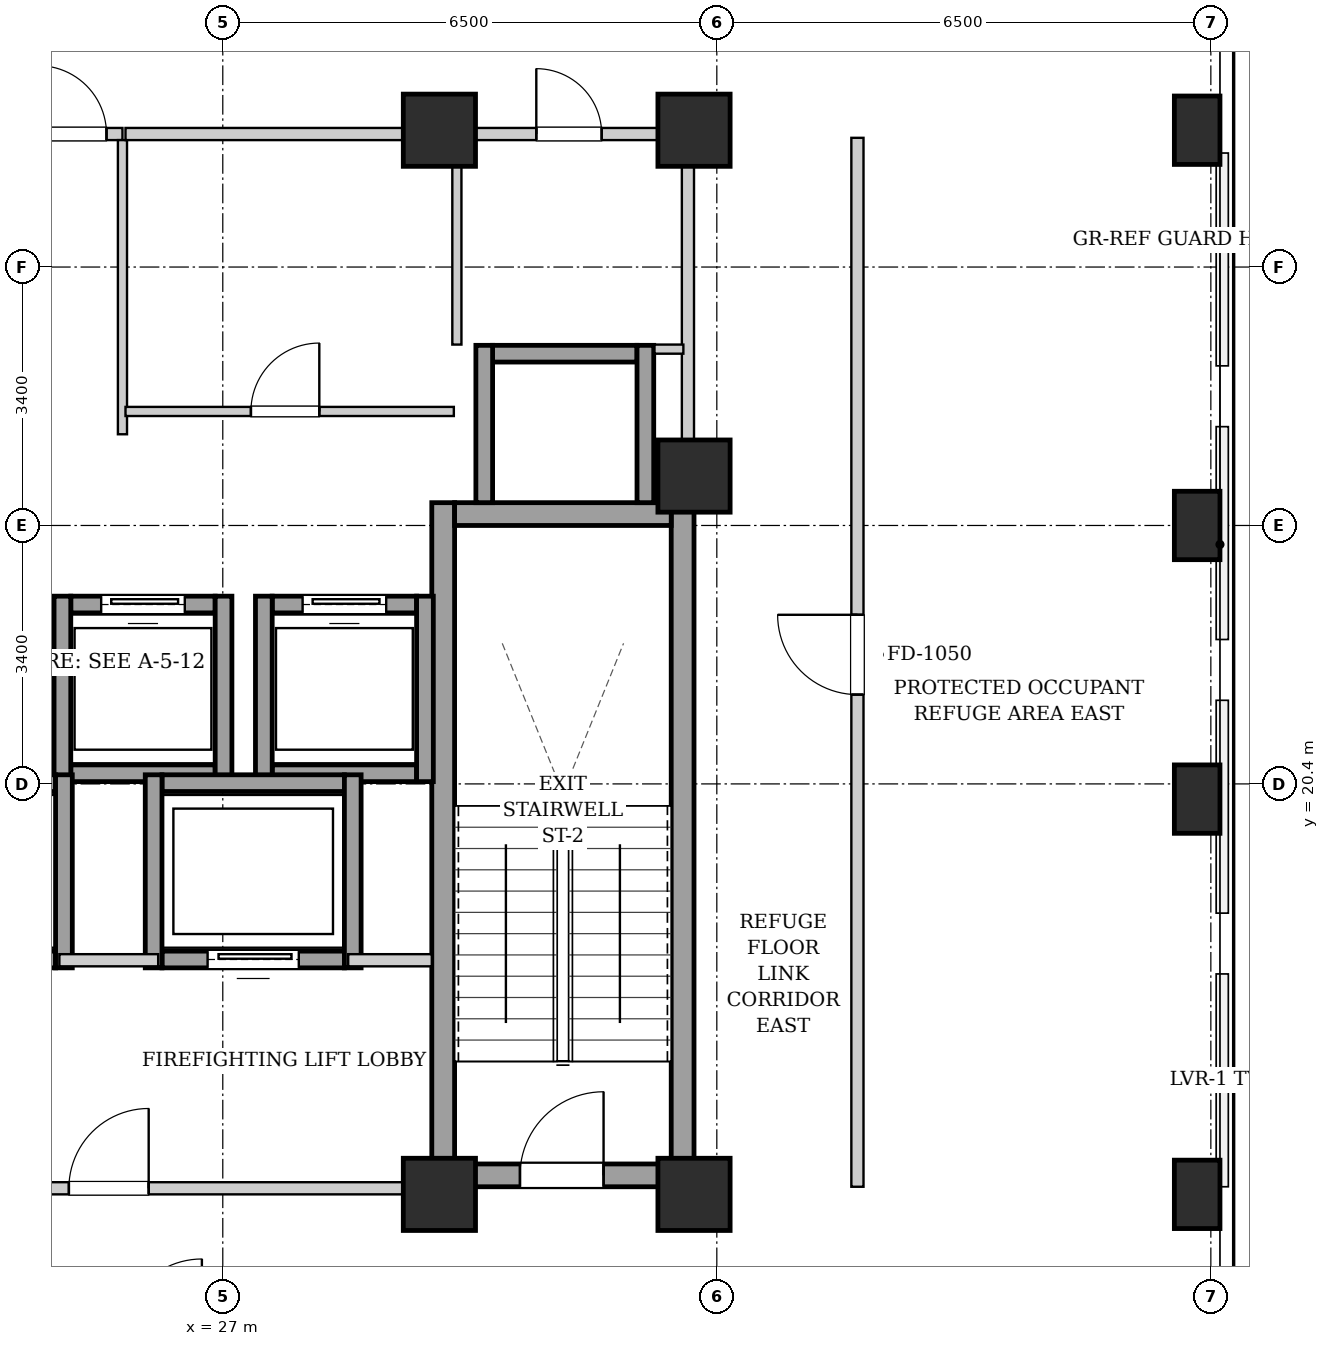
"""IFC4 building model, lengths in metres.
Left out: names, types, materials, properties, quantities, classifications, styles, units other than length and angle.
Written with IfcOpenShell. Run it as: python <this file> out.ifc"""

import sys

from ifc_helpers import new_model, si_unit, direction, frame, frame_2d, origin, origin_2d, place, context, subcontext, project, spatial, rectangle, extrude, element, fill, save


model = new_model("IFC4")
c1 = context("Model", 3, precision=1e-05, world=origin(), true_north=direction((0.0, 1.0)))
c2 = subcontext(c1, "Body", "Model", "MODEL_VIEW")
j1 = project(units=[si_unit("LENGTHUNIT", "METRE"), si_unit("PLANEANGLEUNIT", "RADIAN")], contexts=[c1])
p1 = place(None, origin())
s1 = spatial("IfcSite", under=j1, at=p1, CompositionType="ELEMENT")
p2 = place(p1, origin())
s2 = spatial("IfcBuilding", under=s1, at=p2, CompositionType="ELEMENT")
p3 = place(p2, frame((0.0, 0.0, 169.9)))
s3 = spatial("IfcBuildingStorey", under=s2, at=p3, CompositionType="ELEMENT", Elevation=169.9)
for number, where, z_axis, x_axis in (
    (1, (39.82, 15.0, 0.0), (0.0, 0.0, 1.0), (1.0, 0.0, 0.0)),
    (2, (39.82, 20.2, 0.0), (0.0, 0.0, 1.0), (1.0, 0.0, 0.0)),
    (3, (39.82, 23.8, 0.0), (0.0, 0.0, 1.0), (1.0, 0.0, 0.0)),
    (4, (39.82, 29.0, 0.0), (0.0, 0.0, 1.0), (1.0, 0.0, 0.0)),
):
    element("IfcColumn", number, at=place(p3, frame(where, z_axis=z_axis, x_axis=x_axis)), inside=s3, PredefinedType="COLUMN", context=c2, shape_type="SweptSolid", body=[
        extrude(rectangle(XDim=0.6, YDim=0.9, at=origin_2d()), origin(), (0.0, 0.0, 1.0), 4.5),
    ])
for number, where, z_axis, x_axis in (
    (5, (29.85, 15.0, 0.0), (0.0, 0.0, 1.0), (1.0, 0.0, 0.0)),
    (6, (33.2, 15.0, 0.0), (0.0, 0.0, 1.0), (1.0, 0.0, 0.0)),
    (7, (29.85, 29.0, 0.0), (0.0, 0.0, 1.0), (1.0, 0.0, 0.0)),
    (8, (33.2, 29.0, 0.0), (0.0, 0.0, 1.0), (1.0, 0.0, 0.0)),
    (9, (33.2, 24.45, 0.0), (0.0, 0.0, 1.0), (1.0, 0.0, 0.0)),
):
    element("IfcColumn", number, at=place(p3, frame(where, z_axis=z_axis, x_axis=x_axis)), inside=s3, PredefinedType="COLUMN", context=c2, shape_type="SweptSolid", body=[
        extrude(rectangle(XDim=0.95, YDim=0.95, at=origin_2d()), origin(), (0.0, 0.0, 1.0), 4.5),
    ])
for number, where, z_axis, x_axis in (
    (10, (29.9, 15.1, 0.0), (0.0, 0.0, 1.0), (0.0, 1.0, 0.0)),
    (11, (33.05, 15.1, 0.0), (0.0, 0.0, 1.0), (0.0, 1.0, 0.0)),
):
    element("IfcWall", number, at=place(p3, frame(where, z_axis=z_axis, x_axis=x_axis)), inside=s3, PredefinedType="SHEAR", context=c2, shape_type="SweptSolid", body=[
        extrude(rectangle(XDim=9.0, YDim=0.3, at=frame_2d((4.5, 0.0))), origin(), (0.0, 0.0, 1.0), 4.18),
    ])
p4 = place(p3, frame((30.05, 23.95, 0.0), z_axis=(0.0, 0.0, 1.0), x_axis=(1.0, 0.0, 0.0)))
e12 = element("IfcWall", 12, at=p4, inside=s3, PredefinedType="SHEAR", context=c2, shape_type="SweptSolid", body=[
    extrude(rectangle(XDim=2.85, YDim=0.3, at=frame_2d((1.425, 0.0))), origin(), (0.0, 0.0, 1.0), 4.18),
])
p5 = place(p3, frame((30.05, 15.25, 0.0), z_axis=(0.0, 0.0, 1.0), x_axis=(1.0, 0.0, 0.0)))
e13 = element("IfcWall", 13, at=p5, inside=s3, PredefinedType="SHEAR", context=c2, shape_type="SweptSolid", body=[
    extrude(rectangle(XDim=2.85, YDim=0.3, at=frame_2d((1.425, 0.0))), origin(), (0.0, 0.0, 1.0), 4.18),
])
p6 = place(p5, frame((0.86, 0.0, 0.0)))
e14 = element("IfcOpeningElement", 14, at=p6, cuts=e13, PredefinedType="OPENING", context=c2, shape_type="SweptSolid", body=[
    extrude(rectangle(XDim=1.1, YDim=2.05, at=frame_2d((0.55, 1.025))), frame((0.0, 0.16, 0.0), z_axis=(0.0, -1.0, 0.0), x_axis=(1.0, 0.0, 0.0)), (0.0, 0.0, 1.0), 0.32),
])
p7 = place(p3, frame((25.0, 20.54, 0.0), z_axis=(0.0, 0.0, 1.0), x_axis=(1.0, 0.0, 0.0)))
e15 = element("IfcWall", 15, at=p7, inside=s3, PredefinedType="SHEAR", context=c2, shape_type="SweptSolid", body=[
    extrude(rectangle(XDim=1.9, YDim=0.22, at=frame_2d((0.95, 0.0))), origin(), (0.0, 0.0, 1.0), 4.18),
])
p8 = place(p3, frame((25.0, 22.76, 0.0), z_axis=(0.0, 0.0, 1.0), x_axis=(1.0, 0.0, 0.0)))
e16 = element("IfcWall", 16, at=p8, inside=s3, PredefinedType="SHEAR", context=c2, shape_type="SweptSolid", body=[
    extrude(rectangle(XDim=1.9, YDim=0.22, at=frame_2d((0.95, 0.0))), origin(), (0.0, 0.0, 1.0), 4.18),
])
p9 = place(p8, frame((0.4, 0.0, 0.0)))
e17 = element("IfcOpeningElement", 17, at=p9, cuts=e16, PredefinedType="OPENING", context=c2, shape_type="SweptSolid", body=[
    extrude(rectangle(XDim=1.1, YDim=2.15, at=frame_2d((0.55, 1.075))), frame((0.0, 0.12, 0.0), z_axis=(0.0, -1.0, 0.0), x_axis=(1.0, 0.0, 0.0)), (0.0, 0.0, 1.0), 0.24),
])
for number, where, z_axis, x_axis in (
    (18, (24.89, 20.43, 0.0), (0.0, 0.0, 1.0), (0.0, 1.0, 0.0)),
    (19, (27.01, 20.43, 0.0), (0.0, 0.0, 1.0), (0.0, 1.0, 0.0)),
):
    element("IfcWall", number, at=place(p3, frame(where, z_axis=z_axis, x_axis=x_axis)), inside=s3, PredefinedType="SHEAR", context=c2, shape_type="SweptSolid", body=[
        extrude(rectangle(XDim=2.44, YDim=0.22, at=frame_2d((1.22, 0.0))), origin(), (0.0, 0.0, 1.0), 4.18),
    ])
p10 = place(p3, frame((27.65, 20.54, 0.0), z_axis=(0.0, 0.0, 1.0), x_axis=(1.0, 0.0, 0.0)))
e20 = element("IfcWall", 20, at=p10, inside=s3, PredefinedType="SHEAR", context=c2, shape_type="SweptSolid", body=[
    extrude(rectangle(XDim=1.9, YDim=0.22, at=frame_2d((0.95, 0.0))), origin(), (0.0, 0.0, 1.0), 4.18),
])
p11 = place(p3, frame((27.65, 22.76, 0.0), z_axis=(0.0, 0.0, 1.0), x_axis=(1.0, 0.0, 0.0)))
e21 = element("IfcWall", 21, at=p11, inside=s3, PredefinedType="SHEAR", context=c2, shape_type="SweptSolid", body=[
    extrude(rectangle(XDim=1.9, YDim=0.22, at=frame_2d((0.95, 0.0))), origin(), (0.0, 0.0, 1.0), 4.18),
])
p12 = place(p11, frame((0.4, 0.0, 0.0)))
e22 = element("IfcOpeningElement", 22, at=p12, cuts=e21, PredefinedType="OPENING", context=c2, shape_type="SweptSolid", body=[
    extrude(rectangle(XDim=1.1, YDim=2.15, at=frame_2d((0.55, 1.075))), frame((0.0, 0.12, 0.0), z_axis=(0.0, -1.0, 0.0), x_axis=(1.0, 0.0, 0.0)), (0.0, 0.0, 1.0), 0.24),
])
for number, where, z_axis, x_axis in (
    (23, (27.54, 20.43, 0.0), (0.0, 0.0, 1.0), (0.0, 1.0, 0.0)),
    (24, (29.66, 20.43, 0.0), (0.0, 0.0, 1.0), (0.0, 1.0, 0.0)),
):
    element("IfcWall", number, at=place(p3, frame(where, z_axis=z_axis, x_axis=x_axis)), inside=s3, PredefinedType="SHEAR", context=c2, shape_type="SweptSolid", body=[
        extrude(rectangle(XDim=2.44, YDim=0.22, at=frame_2d((1.22, 0.0))), origin(), (0.0, 0.0, 1.0), 4.18),
    ])
p13 = place(p3, frame((30.55, 26.06, 0.0), z_axis=(0.0, 0.0, 1.0), x_axis=(1.0, 0.0, 0.0)))
e25 = element("IfcWall", 25, at=p13, inside=s3, PredefinedType="SHEAR", context=c2, shape_type="SweptSolid", body=[
    extrude(rectangle(XDim=1.9, YDim=0.22, at=frame_2d((0.95, 0.0))), origin(), (0.0, 0.0, 1.0), 4.18),
])
for number, where, z_axis, x_axis in (
    (26, (30.44, 24.1, 0.0), (0.0, 0.0, 1.0), (0.0, 1.0, 0.0)),
    (27, (32.56, 24.1, 0.0), (0.0, 0.0, 1.0), (0.0, 1.0, 0.0)),
):
    element("IfcWall", number, at=place(p3, frame(where, z_axis=z_axis, x_axis=x_axis)), inside=s3, PredefinedType="SHEAR", context=c2, shape_type="SweptSolid", body=[
        extrude(rectangle(XDim=2.07, YDim=0.22, at=frame_2d((1.035, 0.0))), origin(), (0.0, 0.0, 1.0), 4.18),
    ])
p14 = place(p3, frame((22.4, 18.09, 0.0), z_axis=(0.0, 0.0, 1.0), x_axis=(1.0, 0.0, 0.0)))
e28 = element("IfcWall", 28, at=p14, inside=s3, PredefinedType="SHEAR", context=c2, shape_type="SweptSolid", body=[
    extrude(rectangle(XDim=2.4, YDim=0.22, at=frame_2d((1.2, 0.0))), origin(), (0.0, 0.0, 1.0), 4.18),
])
p15 = place(p14, frame((0.6, 0.0, 0.0)))
e29 = element("IfcOpeningElement", 29, at=p15, cuts=e28, PredefinedType="OPENING", context=c2, shape_type="SweptSolid", body=[
    extrude(rectangle(XDim=1.2, YDim=2.15, at=frame_2d((0.6, 1.075))), frame((0.0, 0.12, 0.0), z_axis=(0.0, -1.0, 0.0), x_axis=(1.0, 0.0, 0.0)), (0.0, 0.0, 1.0), 0.24),
])
p16 = place(p3, frame((22.4, 20.41, 0.0), z_axis=(0.0, 0.0, 1.0), x_axis=(1.0, 0.0, 0.0)))
e30 = element("IfcWall", 30, at=p16, inside=s3, PredefinedType="SHEAR", context=c2, shape_type="SweptSolid", body=[
    extrude(rectangle(XDim=2.4, YDim=0.22, at=frame_2d((1.2, 0.0))), origin(), (0.0, 0.0, 1.0), 4.18),
])
p17 = place(p3, frame((24.91, 17.98, 0.0), z_axis=(0.0, 0.0, 1.0), x_axis=(0.0, 1.0, 0.0)))
e31 = element("IfcWall", 31, at=p17, inside=s3, PredefinedType="SHEAR", context=c2, shape_type="SweptSolid", body=[
    extrude(rectangle(XDim=2.54, YDim=0.22, at=frame_2d((1.27, 0.0))), origin(), (0.0, 0.0, 1.0), 4.18),
])
p18 = place(p3, frame((26.2, 18.09, 0.0), z_axis=(0.0, 0.0, 1.0), x_axis=(1.0, 0.0, 0.0)))
e32 = element("IfcWall", 32, at=p18, inside=s3, PredefinedType="SHEAR", context=c2, shape_type="SweptSolid", body=[
    extrude(rectangle(XDim=2.4, YDim=0.22, at=frame_2d((1.2, 0.0))), origin(), (0.0, 0.0, 1.0), 4.18),
])
p19 = place(p18, frame((0.6, 0.0, 0.0)))
e33 = element("IfcOpeningElement", 33, at=p19, cuts=e32, PredefinedType="OPENING", context=c2, shape_type="SweptSolid", body=[
    extrude(rectangle(XDim=1.2, YDim=2.15, at=frame_2d((0.6, 1.075))), frame((0.0, 0.12, 0.0), z_axis=(0.0, -1.0, 0.0), x_axis=(1.0, 0.0, 0.0)), (0.0, 0.0, 1.0), 0.24),
])
p20 = place(p3, frame((26.2, 20.41, 0.0), z_axis=(0.0, 0.0, 1.0), x_axis=(1.0, 0.0, 0.0)))
e34 = element("IfcWall", 34, at=p20, inside=s3, PredefinedType="SHEAR", context=c2, shape_type="SweptSolid", body=[
    extrude(rectangle(XDim=2.4, YDim=0.22, at=frame_2d((1.2, 0.0))), origin(), (0.0, 0.0, 1.0), 4.18),
])
for number, where, z_axis, x_axis in (
    (35, (26.09, 17.98, 0.0), (0.0, 0.0, 1.0), (0.0, 1.0, 0.0)),
    (36, (28.71, 17.98, 0.0), (0.0, 0.0, 1.0), (0.0, 1.0, 0.0)),
):
    element("IfcWall", number, at=place(p3, frame(where, z_axis=z_axis, x_axis=x_axis)), inside=s3, PredefinedType="SHEAR", context=c2, shape_type="SweptSolid", body=[
        extrude(rectangle(XDim=2.54, YDim=0.22, at=frame_2d((1.27, 0.0))), origin(), (0.0, 0.0, 1.0), 4.18),
    ])
p21 = place(p3, frame((21.25, 15.08, 0.0), z_axis=(0.0, 0.0, 1.0), x_axis=(1.0, 0.0, 0.0)))
e37 = element("IfcWall", 37, at=p21, inside=s3, PredefinedType="PARTITIONING", context=c2, shape_type="SweptSolid", body=[
    extrude(rectangle(XDim=8.5, YDim=0.16, at=frame_2d((4.25, 0.0))), origin(), (0.0, 0.0, 1.0), 4.18),
])
p22 = place(p21, frame((3.725, 0.0, 0.0)))
e38 = element("IfcOpeningElement", 38, at=p22, cuts=e37, PredefinedType="OPENING", context=c2, shape_type="SweptSolid", body=[
    extrude(rectangle(XDim=1.05, YDim=2.05, at=frame_2d((0.525, 1.025))), frame((0.0, 0.09, 0.0), z_axis=(0.0, -1.0, 0.0), x_axis=(1.0, 0.0, 0.0)), (0.0, 0.0, 1.0), 0.18),
])
p23 = place(p3, frame((24.85, 18.08, 0.0), z_axis=(0.0, 0.0, 1.0), x_axis=(1.0, 0.0, 0.0)))
e39 = element("IfcWall", 39, at=p23, inside=s3, PredefinedType="PARTITIONING", context=c2, shape_type="SweptSolid", body=[
    extrude(rectangle(XDim=1.3, YDim=0.16, at=frame_2d((0.65, 0.0))), origin(), (0.0, 0.0, 1.0), 4.18),
])
p24 = place(p3, frame((28.65, 18.08, 0.0), z_axis=(0.0, 0.0, 1.0), x_axis=(1.0, 0.0, 0.0)))
e40 = element("IfcWall", 40, at=p24, inside=s3, PredefinedType="PARTITIONING", context=c2, shape_type="SweptSolid", body=[
    extrude(rectangle(XDim=1.1, YDim=0.16, at=frame_2d((0.55, 0.0))), origin(), (0.0, 0.0, 1.0), 4.18),
])
p25 = place(p3, frame((33.12, 24.12, 0.0), z_axis=(0.0, 0.0, 1.0), x_axis=(0.0, 1.0, 0.0)))
e41 = element("IfcWall", 41, at=p25, inside=s3, PredefinedType="PARTITIONING", context=c2, shape_type="SweptSolid", body=[
    extrude(rectangle(XDim=4.76, YDim=0.16, at=frame_2d((2.38, 0.0))), origin(), (0.0, 0.0, 1.0), 4.18),
])
p26 = place(p3, frame((24.36, 28.95, 0.0), z_axis=(0.0, 0.0, 1.0), x_axis=(1.0, 0.0, 0.0)))
e42 = element("IfcWall", 42, at=p26, inside=s3, PredefinedType="PARTITIONING", context=c2, shape_type="SweptSolid", body=[
    extrude(rectangle(XDim=1.32, YDim=0.16, at=frame_2d((0.66, 0.0))), origin(), (0.0, 0.0, 1.0), 4.18),
])
p27 = place(p26, frame((0.21, 0.0, 0.0)))
e43 = element("IfcOpeningElement", 43, at=p27, cuts=e42, PredefinedType="OPENING", context=c2, shape_type="SweptSolid", body=[
    extrude(rectangle(XDim=0.9, YDim=2.05, at=frame_2d((0.45, 1.025))), frame((0.0, 0.09, 0.0), z_axis=(0.0, -1.0, 0.0), x_axis=(1.0, 0.0, 0.0)), (0.0, 0.0, 1.0), 0.18),
])
p28 = place(p3, frame((25.68, 25.0, 0.0), z_axis=(0.0, 0.0, 1.0), x_axis=(0.0, 1.0, 0.0)))
e44 = element("IfcWall", 44, at=p28, inside=s3, PredefinedType="PARTITIONING", context=c2, shape_type="SweptSolid", body=[
    extrude(rectangle(XDim=3.87, YDim=0.12, at=frame_2d((1.935, 0.0))), origin(), (0.0, 0.0, 1.0), 4.18),
])
p29 = place(p3, frame((30.08, 26.18, 0.0), z_axis=(0.0, 0.0, 1.0), x_axis=(0.0, 1.0, 0.0)))
e45 = element("IfcWall", 45, at=p29, inside=s3, PredefinedType="PARTITIONING", context=c2, shape_type="SweptSolid", body=[
    extrude(rectangle(XDim=2.68, YDim=0.12, at=frame_2d((1.34, 0.0))), origin(), (0.0, 0.0, 1.0), 4.18),
])
p30 = place(p3, frame((32.68, 26.12, 0.0), z_axis=(0.0, 0.0, 1.0), x_axis=(1.0, 0.0, 0.0)))
e46 = element("IfcWall", 46, at=p30, inside=s3, PredefinedType="PARTITIONING", context=c2, shape_type="SweptSolid", body=[
    extrude(rectangle(XDim=0.38, YDim=0.12, at=frame_2d((0.19, 0.0))), origin(), (0.0, 0.0, 1.0), 4.18),
])
p31 = place(p3, frame((25.72, 28.95, 0.0), z_axis=(0.0, 0.0, 1.0), x_axis=(1.0, 0.0, 0.0)))
e47 = element("IfcWall", 47, at=p31, inside=s3, PredefinedType="PARTITIONING", context=c2, shape_type="SweptSolid", body=[
    extrude(rectangle(XDim=4.32, YDim=0.16, at=frame_2d((2.16, 0.0))), origin(), (0.0, 0.0, 1.0), 4.18),
])
p32 = place(p3, frame((25.72, 25.3, 0.0), z_axis=(0.0, 0.0, 1.0), x_axis=(1.0, 0.0, 0.0)))
e48 = element("IfcWall", 48, at=p32, inside=s3, PredefinedType="PARTITIONING", context=c2, shape_type="SweptSolid", body=[
    extrude(rectangle(XDim=4.32, YDim=0.12, at=frame_2d((2.16, 0.0))), origin(), (0.0, 0.0, 1.0), 4.18),
])
p33 = place(p32, frame((1.65, 0.0, 0.0)))
e49 = element("IfcOpeningElement", 49, at=p33, cuts=e48, PredefinedType="OPENING", context=c2, shape_type="SweptSolid", body=[
    extrude(rectangle(XDim=0.9, YDim=2.05, at=frame_2d((0.45, 1.025))), frame((0.0, 0.07, 0.0), z_axis=(0.0, -1.0, 0.0), x_axis=(1.0, 0.0, 0.0)), (0.0, 0.0, 1.0), 0.14),
])
p34 = place(p3, frame((30.08, 28.95, 0.0), z_axis=(0.0, 0.0, 1.0), x_axis=(1.0, 0.0, 0.0)))
e50 = element("IfcWall", 50, at=p34, inside=s3, PredefinedType="PARTITIONING", context=c2, shape_type="SweptSolid", body=[
    extrude(rectangle(XDim=2.96, YDim=0.16, at=frame_2d((1.48, 0.0))), origin(), (0.0, 0.0, 1.0), 4.18),
])
p35 = place(p34, frame((1.045, 0.0, 0.0)))
e51 = element("IfcOpeningElement", 51, at=p35, cuts=e50, PredefinedType="OPENING", context=c2, shape_type="SweptSolid", body=[
    extrude(rectangle(XDim=0.86, YDim=2.05, at=frame_2d((0.43, 1.025))), frame((0.0, 0.09, 0.0), z_axis=(0.0, -1.0, 0.0), x_axis=(1.0, 0.0, 0.0)), (0.0, 0.0, 1.0), 0.18),
])
p36 = place(p3, frame((35.35, 15.1, 0.0), z_axis=(0.0, 0.0, 1.0), x_axis=(0.0, 1.0, 0.0)))
e52 = element("IfcWall", 52, at=p36, inside=s3, PredefinedType="PARTITIONING", context=c2, shape_type="SweptSolid", body=[
    extrude(rectangle(XDim=13.8, YDim=0.16, at=frame_2d((6.9, 0.0))), origin(), (0.0, 0.0, 1.0), 4.18),
])
p37 = place(p36, frame((6.475, 0.0, 0.0)))
e53 = element("IfcOpeningElement", 53, at=p37, cuts=e52, PredefinedType="OPENING", context=c2, shape_type="SweptSolid", body=[
    extrude(rectangle(XDim=1.05, YDim=2.05, at=frame_2d((0.525, 1.025))), frame((0.0, 0.09, 0.0), z_axis=(0.0, -1.0, 0.0), x_axis=(1.0, 0.0, 0.0)), (0.0, 0.0, 1.0), 0.18),
])
p38 = place(p6, origin())
e54 = element("IfcDoor", 54, at=p38, inside=s3, OperationType="SINGLE_SWING_RIGHT", PredefinedType="DOOR", context=c2, shape_type="SweptSolid", body=[
    extrude(rectangle(XDim=1.1, YDim=2.05, at=frame_2d((0.55, 1.025))), frame((0.0, 0.025, 0.0), z_axis=(0.0, -1.0, 0.0), x_axis=(1.0, 0.0, 0.0)), (0.0, 0.0, 1.0), 0.05),
])
fill(e14, e54)
p39 = place(p9, origin())
e55 = element("IfcDoor", 55, at=p39, inside=s3, OperationType="SLIDING_TO_LEFT", PredefinedType="DOOR", context=c2, shape_type="SweptSolid", body=[
    extrude(rectangle(XDim=1.1, YDim=2.15, at=frame_2d((0.55, 1.075))), frame((0.0, 0.025, 0.0), z_axis=(0.0, -1.0, 0.0), x_axis=(1.0, 0.0, 0.0)), (0.0, 0.0, 1.0), 0.05),
])
fill(e17, e55)
p40 = place(p12, origin())
e56 = element("IfcDoor", 56, at=p40, inside=s3, OperationType="SLIDING_TO_LEFT", PredefinedType="DOOR", context=c2, shape_type="SweptSolid", body=[
    extrude(rectangle(XDim=1.1, YDim=2.15, at=frame_2d((0.55, 1.075))), frame((0.0, 0.025, 0.0), z_axis=(0.0, -1.0, 0.0), x_axis=(1.0, 0.0, 0.0)), (0.0, 0.0, 1.0), 0.05),
])
fill(e22, e56)
p41 = place(p19, origin())
e57 = element("IfcDoor", 57, at=p41, inside=s3, OperationType="SLIDING_TO_LEFT", PredefinedType="DOOR", context=c2, shape_type="SweptSolid", body=[
    extrude(rectangle(XDim=1.2, YDim=2.15, at=frame_2d((0.6, 1.075))), frame((0.0, 0.025, 0.0), z_axis=(0.0, -1.0, 0.0), x_axis=(1.0, 0.0, 0.0)), (0.0, 0.0, 1.0), 0.05),
])
fill(e33, e57)
p42 = place(p22, origin())
e58 = element("IfcDoor", 58, at=p42, inside=s3, OperationType="SINGLE_SWING_RIGHT", PredefinedType="DOOR", context=c2, shape_type="SweptSolid", body=[
    extrude(rectangle(XDim=1.05, YDim=2.05, at=frame_2d((0.525, 1.025))), frame((0.0, 0.025, 0.0), z_axis=(0.0, -1.0, 0.0), x_axis=(1.0, 0.0, 0.0)), (0.0, 0.0, 1.0), 0.05),
])
fill(e38, e58)
p43 = place(p27, origin())
e59 = element("IfcDoor", 59, at=p43, inside=s3, OperationType="SINGLE_SWING_LEFT", PredefinedType="DOOR", context=c2, shape_type="SweptSolid", body=[
    extrude(rectangle(XDim=0.9, YDim=2.05, at=frame_2d((0.45, 1.025))), frame((0.0, 0.025, 0.0), z_axis=(0.0, -1.0, 0.0), x_axis=(1.0, 0.0, 0.0)), (0.0, 0.0, 1.0), 0.05),
])
fill(e43, e59)
p44 = place(p33, origin())
e60 = element("IfcDoor", 60, at=p44, inside=s3, OperationType="SINGLE_SWING_RIGHT", PredefinedType="DOOR", context=c2, shape_type="SweptSolid", body=[
    extrude(rectangle(XDim=0.9, YDim=2.05, at=frame_2d((0.45, 1.025))), frame((0.0, 0.025, 0.0), z_axis=(0.0, -1.0, 0.0), x_axis=(1.0, 0.0, 0.0)), (0.0, 0.0, 1.0), 0.05),
])
fill(e49, e60)
p45 = place(p35, origin())
e61 = element("IfcDoor", 61, at=p45, inside=s3, OperationType="SINGLE_SWING_LEFT", PredefinedType="DOOR", context=c2, shape_type="SweptSolid", body=[
    extrude(rectangle(XDim=0.86, YDim=2.05, at=frame_2d((0.43, 1.025))), frame((0.0, 0.025, 0.0), z_axis=(0.0, -1.0, 0.0), x_axis=(1.0, 0.0, 0.0)), (0.0, 0.0, 1.0), 0.05),
])
fill(e51, e61)
p46 = place(p37, origin())
e62 = element("IfcDoor", 62, at=p46, inside=s3, OperationType="SINGLE_SWING_RIGHT", PredefinedType="DOOR", context=c2, shape_type="SweptSolid", body=[
    extrude(rectangle(XDim=1.05, YDim=2.05, at=frame_2d((0.525, 1.025))), frame((0.0, 0.025, 0.0), z_axis=(0.0, -1.0, 0.0), x_axis=(1.0, 0.0, 0.0)), (0.0, 0.0, 1.0), 0.05),
])
fill(e53, e62)
save(model, sys.argv[1])
